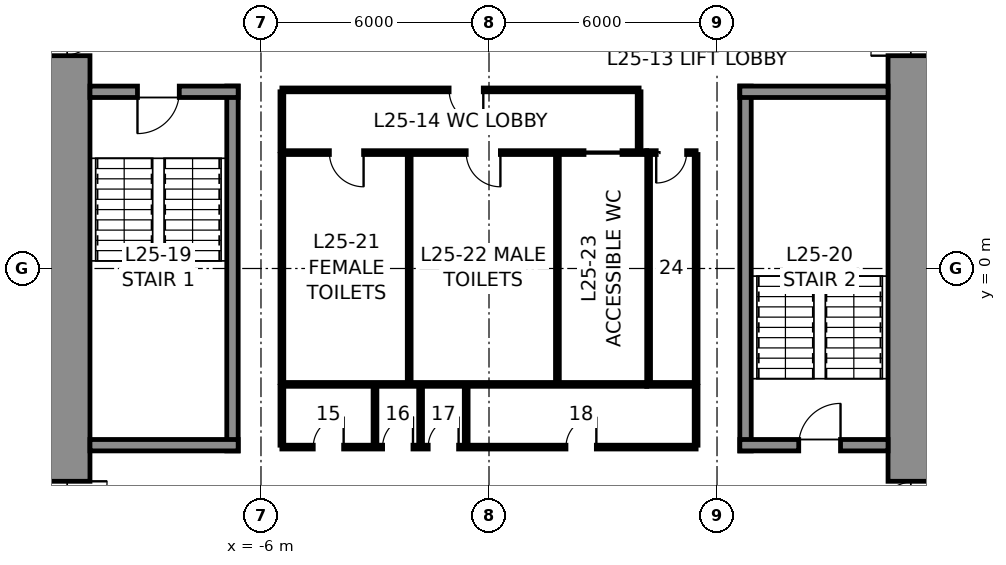
"""IFC4 building model, lengths in metres.
Left out: names, types, materials, properties, quantities, classifications, styles, units other than length and angle.
Written with IfcOpenShell. Run it as: python <this file> out.ifc"""

import sys

from ifc_helpers import new_model, si_unit, direction, frame, frame_2d, origin, place, context, subcontext, project, spatial, rectangle, extrude, element, fill, save


model = new_model("IFC4")
c1 = context("Model", 3, precision=1e-05, world=origin(), true_north=direction((0.0, 1.0)))
c2 = subcontext(c1, "Body", "Model", "MODEL_VIEW")
j1 = project(units=[si_unit("LENGTHUNIT", "METRE"), si_unit("PLANEANGLEUNIT", "RADIAN")], contexts=[c1])
p1 = place(None, origin())
s1 = spatial("IfcSite", under=j1, at=p1, CompositionType="ELEMENT")
p2 = place(p1, origin())
s2 = spatial("IfcBuilding", under=s1, at=p2, CompositionType="ELEMENT")
p3 = place(p2, frame((0.0, 0.0, 127.8)))
s3 = spatial("IfcBuildingStorey", under=s2, at=p3, CompositionType="ELEMENT", Elevation=127.8)
p4 = place(p3, frame((11.25, 10.5, 0.0), z_axis=(0.0, 0.0, 1.0), x_axis=(0.0, -1.0, 0.0)))
e1 = element("IfcWall", 1, at=p4, inside=s3, PredefinedType="SHEAR", context=c2, shape_type="SweptSolid", body=[
    extrude(rectangle(XDim=21.0, YDim=1.5, at=frame_2d((10.5, 0.0))), origin(), (0.0, 0.0, 1.0), 4.0),
])
p5 = place(p4, frame((3.7, 0.0, 0.0)))
e2 = element("IfcOpeningElement", 2, at=p5, cuts=e1, PredefinedType="OPENING", context=c2, shape_type="SweptSolid", body=[
    extrude(rectangle(XDim=1.2, YDim=2.3, at=frame_2d((0.6, 1.15))), frame((0.0, 0.76, 0.0), z_axis=(0.0, -1.0, 0.0), x_axis=(1.0, 0.0, 0.0)), (0.0, 0.0, 1.0), 1.52),
])
p6 = place(p4, frame((16.1, 0.0, 0.0)))
e3 = element("IfcOpeningElement", 3, at=p6, cuts=e1, PredefinedType="OPENING", context=c2, shape_type="SweptSolid", body=[
    extrude(rectangle(XDim=1.2, YDim=2.3, at=frame_2d((0.6, 1.15))), frame((0.0, 0.76, 0.0), z_axis=(0.0, -1.0, 0.0), x_axis=(1.0, 0.0, 0.0)), (0.0, 0.0, 1.0), 1.52),
])
p7 = place(p3, frame((-11.25, -10.5, 0.0), z_axis=(0.0, 0.0, 1.0), x_axis=(0.0, 1.0, 0.0)))
e4 = element("IfcWall", 4, at=p7, inside=s3, PredefinedType="SHEAR", context=c2, shape_type="SweptSolid", body=[
    extrude(rectangle(XDim=21.0, YDim=1.5, at=frame_2d((10.5, 0.0))), origin(), (0.0, 0.0, 1.0), 4.0),
])
p8 = place(p7, frame((16.1, 0.0, 0.0)))
e5 = element("IfcOpeningElement", 5, at=p8, cuts=e4, PredefinedType="OPENING", context=c2, shape_type="SweptSolid", body=[
    extrude(rectangle(XDim=1.2, YDim=2.3, at=frame_2d((0.6, 1.15))), frame((0.0, 0.76, 0.0), z_axis=(0.0, -1.0, 0.0), x_axis=(1.0, 0.0, 0.0)), (0.0, 0.0, 1.0), 1.52),
])
p9 = place(p7, frame((3.7, 0.0, 0.0)))
e6 = element("IfcOpeningElement", 6, at=p9, cuts=e4, PredefinedType="OPENING", context=c2, shape_type="SweptSolid", body=[
    extrude(rectangle(XDim=1.2, YDim=2.3, at=frame_2d((0.6, 1.15))), frame((0.0, 0.76, 0.0), z_axis=(0.0, -1.0, 0.0), x_axis=(1.0, 0.0, 0.0)), (0.0, 0.0, 1.0), 1.52),
])
p10 = place(p3, frame((-6.75, -4.8, 0.0), z_axis=(0.0, 0.0, 1.0), x_axis=(0.0, 1.0, 0.0)))
e7 = element("IfcWall", 7, at=p10, inside=s3, PredefinedType="SOLIDWALL", context=c2, shape_type="SweptSolid", body=[
    extrude(rectangle(XDim=9.6, YDim=0.3, at=frame_2d((4.8, 0.0))), origin(), (0.0, 0.0, 1.0), 3.75),
])
p11 = place(p3, frame((-10.5, 4.65, 0.0), z_axis=(0.0, 0.0, 1.0), x_axis=(1.0, 0.0, 0.0)))
e8 = element("IfcWall", 8, at=p11, inside=s3, PredefinedType="SOLIDWALL", context=c2, shape_type="SweptSolid", body=[
    extrude(rectangle(XDim=3.9, YDim=0.3, at=frame_2d((1.95, 0.0))), origin(), (0.0, 0.0, 1.0), 3.75),
])
p12 = place(p11, frame((1.25, 0.0, 0.0)))
e9 = element("IfcOpeningElement", 9, at=p12, cuts=e8, PredefinedType="OPENING", context=c2, shape_type="SweptSolid", body=[
    extrude(rectangle(XDim=1.1, YDim=2.3, at=frame_2d((0.55, 1.15))), frame((0.0, 0.16, 0.0), z_axis=(0.0, -1.0, 0.0), x_axis=(1.0, 0.0, 0.0)), (0.0, 0.0, 1.0), 0.32),
])
p13 = place(p3, frame((-6.6, -4.65, 0.0), z_axis=(0.0, 0.0, 1.0), x_axis=(-1.0, 0.0, 0.0)))
e10 = element("IfcWall", 10, at=p13, inside=s3, PredefinedType="SOLIDWALL", context=c2, shape_type="SweptSolid", body=[
    extrude(rectangle(XDim=3.9, YDim=0.3, at=frame_2d((1.95, 0.0))), origin(), (0.0, 0.0, 1.0), 3.75),
])
p14 = place(p3, frame((6.75, -4.8, 0.0), z_axis=(0.0, 0.0, 1.0), x_axis=(0.0, 1.0, 0.0)))
e11 = element("IfcWall", 11, at=p14, inside=s3, PredefinedType="SOLIDWALL", context=c2, shape_type="SweptSolid", body=[
    extrude(rectangle(XDim=9.6, YDim=0.3, at=frame_2d((4.8, 0.0))), origin(), (0.0, 0.0, 1.0), 3.75),
])
p15 = place(p3, frame((6.6, 4.65, 0.0), z_axis=(0.0, 0.0, 1.0), x_axis=(1.0, 0.0, 0.0)))
e12 = element("IfcWall", 12, at=p15, inside=s3, PredefinedType="SOLIDWALL", context=c2, shape_type="SweptSolid", body=[
    extrude(rectangle(XDim=3.9, YDim=0.3, at=frame_2d((1.95, 0.0))), origin(), (0.0, 0.0, 1.0), 3.75),
])
p16 = place(p3, frame((10.5, -4.65, 0.0), z_axis=(0.0, 0.0, 1.0), x_axis=(-1.0, 0.0, 0.0)))
e13 = element("IfcWall", 13, at=p16, inside=s3, PredefinedType="SOLIDWALL", context=c2, shape_type="SweptSolid", body=[
    extrude(rectangle(XDim=3.9, YDim=0.3, at=frame_2d((1.95, 0.0))), origin(), (0.0, 0.0, 1.0), 3.75),
])
p17 = place(p16, frame((1.25, 0.0, 0.0)))
e14 = element("IfcOpeningElement", 14, at=p17, cuts=e13, PredefinedType="OPENING", context=c2, shape_type="SweptSolid", body=[
    extrude(rectangle(XDim=1.1, YDim=2.3, at=frame_2d((0.55, 1.15))), frame((0.0, 0.16, 0.0), z_axis=(0.0, -1.0, 0.0), x_axis=(1.0, 0.0, 0.0)), (0.0, 0.0, 1.0), 0.32),
])
p18 = place(p3, frame((-5.45, 3.05, 0.0), z_axis=(0.0, 0.0, 1.0), x_axis=(1.0, 0.0, 0.0)))
e15 = element("IfcWall", 15, at=p18, inside=s3, PredefinedType="PARTITIONING", context=c2, shape_type="SweptSolid", body=[
    extrude(rectangle(XDim=9.6, YDim=0.1, at=frame_2d((4.8, 0.0))), origin(), (0.0, 0.0, 1.0), 3.75),
])
p19 = place(p18, frame((1.25, 0.0, 0.0)))
e16 = element("IfcOpeningElement", 16, at=p19, cuts=e15, PredefinedType="OPENING", context=c2, shape_type="SweptSolid", body=[
    extrude(rectangle(XDim=0.9, YDim=2.3, at=frame_2d((0.45, 1.15))), frame((0.0, 0.06, 0.0), z_axis=(0.0, -1.0, 0.0), x_axis=(1.0, 0.0, 0.0)), (0.0, 0.0, 1.0), 0.12),
])
p20 = place(p18, frame((4.85, 0.0, 0.0)))
e17 = element("IfcOpeningElement", 17, at=p20, cuts=e15, PredefinedType="OPENING", context=c2, shape_type="SweptSolid", body=[
    extrude(rectangle(XDim=0.9, YDim=2.3, at=frame_2d((0.45, 1.15))), frame((0.0, 0.06, 0.0), z_axis=(0.0, -1.0, 0.0), x_axis=(1.0, 0.0, 0.0)), (0.0, 0.0, 1.0), 0.12),
])
p21 = place(p18, frame((7.95, 0.0, 0.0)))
e18 = element("IfcOpeningElement", 18, at=p21, cuts=e15, PredefinedType="OPENING", context=c2, shape_type="SweptSolid", body=[
    extrude(rectangle(XDim=1.0, YDim=2.3, at=frame_2d((0.5, 1.15))), frame((0.0, 0.06, 0.0), z_axis=(0.0, -1.0, 0.0), x_axis=(1.0, 0.0, 0.0)), (0.0, 0.0, 1.0), 0.12),
])
p22 = place(p3, frame((4.15, 3.05, 0.0), z_axis=(0.0, 0.0, 1.0), x_axis=(1.0, 0.0, 0.0)))
e19 = element("IfcWall", 19, at=p22, inside=s3, PredefinedType="PARTITIONING", context=c2, shape_type="SweptSolid", body=[
    extrude(rectangle(XDim=1.3, YDim=0.1, at=frame_2d((0.65, 0.0))), origin(), (0.0, 0.0, 1.0), 3.75),
])
p23 = place(p22, frame((0.25, 0.0, 0.0)))
e20 = element("IfcOpeningElement", 20, at=p23, cuts=e19, PredefinedType="OPENING", context=c2, shape_type="SweptSolid", body=[
    extrude(rectangle(XDim=0.8, YDim=2.3, at=frame_2d((0.4, 1.15))), frame((0.0, 0.06, 0.0), z_axis=(0.0, -1.0, 0.0), x_axis=(1.0, 0.0, 0.0)), (0.0, 0.0, 1.0), 0.12),
])
p24 = place(p3, frame((4.15, -3.05, 0.0), z_axis=(0.0, 0.0, 1.0), x_axis=(-1.0, 0.0, 0.0)))
e21 = element("IfcWall", 21, at=p24, inside=s3, PredefinedType="PARTITIONING", context=c2, shape_type="SweptSolid", body=[
    extrude(rectangle(XDim=9.6, YDim=0.1, at=frame_2d((4.8, 0.0))), origin(), (0.0, 0.0, 1.0), 3.75),
])
p25 = place(p3, frame((5.45, -3.05, 0.0), z_axis=(0.0, 0.0, 1.0), x_axis=(-1.0, 0.0, 0.0)))
e22 = element("IfcWall", 22, at=p25, inside=s3, PredefinedType="PARTITIONING", context=c2, shape_type="SweptSolid", body=[
    extrude(rectangle(XDim=1.3, YDim=0.1, at=frame_2d((0.65, 0.0))), origin(), (0.0, 0.0, 1.0), 3.75),
])
for number, where, z_axis, x_axis in (
    (23, (5.45, 3.0, 0.0), (0.0, 0.0, 1.0), (0.0, -1.0, 0.0)),
    (24, (-5.45, -3.0, 0.0), (0.0, 0.0, 1.0), (0.0, 1.0, 0.0)),
    (25, (-2.1, -3.0, 0.0), (0.0, 0.0, 1.0), (0.0, 1.0, 0.0)),
    (26, (1.8, -3.0, 0.0), (0.0, 0.0, 1.0), (0.0, 1.0, 0.0)),
    (27, (4.2, -3.0, 0.0), (0.0, 0.0, 1.0), (0.0, 1.0, 0.0)),
):
    element("IfcWall", number, at=place(p3, frame(where, z_axis=z_axis, x_axis=x_axis)), inside=s3, PredefinedType="PARTITIONING", context=c2, shape_type="SweptSolid", body=[
        extrude(rectangle(XDim=6.0, YDim=0.1, at=frame_2d((3.0, 0.0))), origin(), (0.0, 0.0, 1.0), 3.75),
    ])
p26 = place(p3, frame((-5.45, 4.7, 0.0), z_axis=(0.0, 0.0, 1.0), x_axis=(1.0, 0.0, 0.0)))
e28 = element("IfcWall", 28, at=p26, inside=s3, PredefinedType="PARTITIONING", context=c2, shape_type="SweptSolid", body=[
    extrude(rectangle(XDim=9.4, YDim=0.1, at=frame_2d((4.7, 0.0))), origin(), (0.0, 0.0, 1.0), 3.75),
])
p27 = place(p26, frame((4.4, 0.0, 0.0)))
e29 = element("IfcOpeningElement", 29, at=p27, cuts=e28, PredefinedType="OPENING", context=c2, shape_type="SweptSolid", body=[
    extrude(rectangle(XDim=0.9, YDim=2.3, at=frame_2d((0.45, 1.15))), frame((0.0, 0.06, 0.0), z_axis=(0.0, -1.0, 0.0), x_axis=(1.0, 0.0, 0.0)), (0.0, 0.0, 1.0), 0.12),
])
for number, where, z_axis, x_axis in (
    (30, (-5.45, 3.1, 0.0), (0.0, 0.0, 1.0), (0.0, 1.0, 0.0)),
    (31, (3.95, 3.1, 0.0), (0.0, 0.0, 1.0), (0.0, 1.0, 0.0)),
):
    element("IfcWall", number, at=place(p3, frame(where, z_axis=z_axis, x_axis=x_axis)), inside=s3, PredefinedType="PARTITIONING", context=c2, shape_type="SweptSolid", body=[
        extrude(rectangle(XDim=1.55, YDim=0.1, at=frame_2d((0.775, 0.0))), origin(), (0.0, 0.0, 1.0), 3.75),
    ])
p28 = place(p3, frame((5.45, -4.7, 0.0), z_axis=(0.0, 0.0, 1.0), x_axis=(-1.0, 0.0, 0.0)))
e32 = element("IfcWall", 32, at=p28, inside=s3, PredefinedType="PARTITIONING", context=c2, shape_type="SweptSolid", body=[
    extrude(rectangle(XDim=10.9, YDim=0.1, at=frame_2d((5.45, 0.0))), origin(), (0.0, 0.0, 1.0), 3.75),
])
p29 = place(p28, frame((9.275, 0.0, 0.0)))
e33 = element("IfcOpeningElement", 33, at=p29, cuts=e32, PredefinedType="OPENING", context=c2, shape_type="SweptSolid", body=[
    extrude(rectangle(XDim=0.8, YDim=2.3, at=frame_2d((0.4, 1.15))), frame((0.0, 0.06, 0.0), z_axis=(0.0, -1.0, 0.0), x_axis=(1.0, 0.0, 0.0)), (0.0, 0.0, 1.0), 0.12),
])
p30 = place(p28, frame((7.45, 0.0, 0.0)))
e34 = element("IfcOpeningElement", 34, at=p30, cuts=e32, PredefinedType="OPENING", context=c2, shape_type="SweptSolid", body=[
    extrude(rectangle(XDim=0.8, YDim=2.3, at=frame_2d((0.4, 1.15))), frame((0.0, 0.06, 0.0), z_axis=(0.0, -1.0, 0.0), x_axis=(1.0, 0.0, 0.0)), (0.0, 0.0, 1.0), 0.12),
])
p31 = place(p28, frame((6.25, 0.0, 0.0)))
e35 = element("IfcOpeningElement", 35, at=p31, cuts=e32, PredefinedType="OPENING", context=c2, shape_type="SweptSolid", body=[
    extrude(rectangle(XDim=0.8, YDim=2.3, at=frame_2d((0.4, 1.15))), frame((0.0, 0.06, 0.0), z_axis=(0.0, -1.0, 0.0), x_axis=(1.0, 0.0, 0.0)), (0.0, 0.0, 1.0), 0.12),
])
p32 = place(p28, frame((2.625, 0.0, 0.0)))
e36 = element("IfcOpeningElement", 36, at=p32, cuts=e32, PredefinedType="OPENING", context=c2, shape_type="SweptSolid", body=[
    extrude(rectangle(XDim=0.8, YDim=2.3, at=frame_2d((0.4, 1.15))), frame((0.0, 0.06, 0.0), z_axis=(0.0, -1.0, 0.0), x_axis=(1.0, 0.0, 0.0)), (0.0, 0.0, 1.0), 0.12),
])
for number, where, z_axis, x_axis in (
    (37, (-5.45, -3.1, 0.0), (0.0, 0.0, 1.0), (0.0, -1.0, 0.0)),
    (38, (5.45, -3.1, 0.0), (0.0, 0.0, 1.0), (0.0, -1.0, 0.0)),
    (39, (-3.0, -3.1, 0.0), (0.0, 0.0, 1.0), (0.0, -1.0, 0.0)),
    (40, (-1.8, -3.1, 0.0), (0.0, 0.0, 1.0), (0.0, -1.0, 0.0)),
    (41, (-0.6, -3.1, 0.0), (0.0, 0.0, 1.0), (0.0, -1.0, 0.0)),
):
    element("IfcWall", number, at=place(p3, frame(where, z_axis=z_axis, x_axis=x_axis)), inside=s3, PredefinedType="PARTITIONING", context=c2, shape_type="SweptSolid", body=[
        extrude(rectangle(XDim=1.55, YDim=0.1, at=frame_2d((0.775, 0.0))), origin(), (0.0, 0.0, 1.0), 3.75),
    ])
p33 = place(p12, frame((1.1, 0.0, 0.0), z_axis=(0.0, 0.0, 1.0), x_axis=(-1.0, 0.0, 0.0)))
e42 = element("IfcDoor", 42, at=p33, inside=s3, OperationType="SINGLE_SWING_RIGHT", PredefinedType="DOOR", context=c2, shape_type="SweptSolid", body=[
    extrude(rectangle(XDim=1.1, YDim=2.3, at=frame_2d((0.55, 1.15))), frame((0.0, 0.025, 0.0), z_axis=(0.0, -1.0, 0.0), x_axis=(1.0, 0.0, 0.0)), (0.0, 0.0, 1.0), 0.05),
])
fill(e9, e42)
p34 = place(p17, frame((1.1, 0.0, 0.0), z_axis=(0.0, 0.0, 1.0), x_axis=(-1.0, 0.0, 0.0)))
e43 = element("IfcDoor", 43, at=p34, inside=s3, OperationType="SINGLE_SWING_RIGHT", PredefinedType="DOOR", context=c2, shape_type="SweptSolid", body=[
    extrude(rectangle(XDim=1.1, YDim=2.3, at=frame_2d((0.55, 1.15))), frame((0.0, 0.025, 0.0), z_axis=(0.0, -1.0, 0.0), x_axis=(1.0, 0.0, 0.0)), (0.0, 0.0, 1.0), 0.05),
])
fill(e14, e43)
p35 = place(p19, frame((0.9, 0.0, 0.0), z_axis=(0.0, 0.0, 1.0), x_axis=(-1.0, 0.0, 0.0)))
e44 = element("IfcDoor", 44, at=p35, inside=s3, OperationType="SINGLE_SWING_LEFT", PredefinedType="DOOR", context=c2, shape_type="SweptSolid", body=[
    extrude(rectangle(XDim=0.9, YDim=2.3, at=frame_2d((0.45, 1.15))), frame((0.0, 0.025, 0.0), z_axis=(0.0, -1.0, 0.0), x_axis=(1.0, 0.0, 0.0)), (0.0, 0.0, 1.0), 0.05),
])
fill(e16, e44)
p36 = place(p20, frame((0.9, 0.0, 0.0), z_axis=(0.0, 0.0, 1.0), x_axis=(-1.0, 0.0, 0.0)))
e45 = element("IfcDoor", 45, at=p36, inside=s3, OperationType="SINGLE_SWING_LEFT", PredefinedType="DOOR", context=c2, shape_type="SweptSolid", body=[
    extrude(rectangle(XDim=0.9, YDim=2.3, at=frame_2d((0.45, 1.15))), frame((0.0, 0.025, 0.0), z_axis=(0.0, -1.0, 0.0), x_axis=(1.0, 0.0, 0.0)), (0.0, 0.0, 1.0), 0.05),
])
fill(e17, e45)
p37 = place(p21, frame((1.0, 0.0, 0.0), z_axis=(0.0, 0.0, 1.0), x_axis=(-1.0, 0.0, 0.0)))
e46 = element("IfcDoor", 46, at=p37, inside=s3, OperationType="SLIDING_TO_LEFT", PredefinedType="DOOR", context=c2, shape_type="SweptSolid", body=[
    extrude(rectangle(XDim=1.0, YDim=2.3, at=frame_2d((0.5, 1.15))), frame((0.0, 0.025, 0.0), z_axis=(0.0, -1.0, 0.0), x_axis=(1.0, 0.0, 0.0)), (0.0, 0.0, 1.0), 0.05),
])
fill(e18, e46)
p38 = place(p23, frame((0.8, 0.0, 0.0), z_axis=(0.0, 0.0, 1.0), x_axis=(-1.0, 0.0, 0.0)))
e47 = element("IfcDoor", 47, at=p38, inside=s3, OperationType="SINGLE_SWING_RIGHT", PredefinedType="DOOR", context=c2, shape_type="SweptSolid", body=[
    extrude(rectangle(XDim=0.8, YDim=2.3, at=frame_2d((0.4, 1.15))), frame((0.0, 0.025, 0.0), z_axis=(0.0, -1.0, 0.0), x_axis=(1.0, 0.0, 0.0)), (0.0, 0.0, 1.0), 0.05),
])
fill(e20, e47)
p39 = place(p27, frame((0.9, 0.0, 0.0), z_axis=(0.0, 0.0, 1.0), x_axis=(-1.0, 0.0, 0.0)))
e48 = element("IfcDoor", 48, at=p39, inside=s3, OperationType="SINGLE_SWING_LEFT", PredefinedType="DOOR", context=c2, shape_type="SweptSolid", body=[
    extrude(rectangle(XDim=0.9, YDim=2.3, at=frame_2d((0.45, 1.15))), frame((0.0, 0.025, 0.0), z_axis=(0.0, -1.0, 0.0), x_axis=(1.0, 0.0, 0.0)), (0.0, 0.0, 1.0), 0.05),
])
fill(e29, e48)
p40 = place(p29, frame((0.8, 0.0, 0.0), z_axis=(0.0, 0.0, 1.0), x_axis=(-1.0, 0.0, 0.0)))
e49 = element("IfcDoor", 49, at=p40, inside=s3, OperationType="SINGLE_SWING_RIGHT", PredefinedType="DOOR", context=c2, shape_type="SweptSolid", body=[
    extrude(rectangle(XDim=0.8, YDim=2.3, at=frame_2d((0.4, 1.15))), frame((0.0, 0.025, 0.0), z_axis=(0.0, -1.0, 0.0), x_axis=(1.0, 0.0, 0.0)), (0.0, 0.0, 1.0), 0.05),
])
fill(e33, e49)
p41 = place(p30, frame((0.8, 0.0, 0.0), z_axis=(0.0, 0.0, 1.0), x_axis=(-1.0, 0.0, 0.0)))
e50 = element("IfcDoor", 50, at=p41, inside=s3, OperationType="SINGLE_SWING_RIGHT", PredefinedType="DOOR", context=c2, shape_type="SweptSolid", body=[
    extrude(rectangle(XDim=0.8, YDim=2.3, at=frame_2d((0.4, 1.15))), frame((0.0, 0.025, 0.0), z_axis=(0.0, -1.0, 0.0), x_axis=(1.0, 0.0, 0.0)), (0.0, 0.0, 1.0), 0.05),
])
fill(e34, e50)
p42 = place(p31, frame((0.8, 0.0, 0.0), z_axis=(0.0, 0.0, 1.0), x_axis=(-1.0, 0.0, 0.0)))
e51 = element("IfcDoor", 51, at=p42, inside=s3, OperationType="SINGLE_SWING_RIGHT", PredefinedType="DOOR", context=c2, shape_type="SweptSolid", body=[
    extrude(rectangle(XDim=0.8, YDim=2.3, at=frame_2d((0.4, 1.15))), frame((0.0, 0.025, 0.0), z_axis=(0.0, -1.0, 0.0), x_axis=(1.0, 0.0, 0.0)), (0.0, 0.0, 1.0), 0.05),
])
fill(e35, e51)
p43 = place(p32, frame((0.8, 0.0, 0.0), z_axis=(0.0, 0.0, 1.0), x_axis=(-1.0, 0.0, 0.0)))
e52 = element("IfcDoor", 52, at=p43, inside=s3, OperationType="SINGLE_SWING_RIGHT", PredefinedType="DOOR", context=c2, shape_type="SweptSolid", body=[
    extrude(rectangle(XDim=0.8, YDim=2.3, at=frame_2d((0.4, 1.15))), frame((0.0, 0.025, 0.0), z_axis=(0.0, -1.0, 0.0), x_axis=(1.0, 0.0, 0.0)), (0.0, 0.0, 1.0), 0.05),
])
fill(e36, e52)
p44 = place(p8, frame((1.2, 0.0, 0.0), z_axis=(0.0, 0.0, 1.0), x_axis=(-1.0, 0.0, 0.0)))
e53 = element("IfcDoor", 53, at=p44, inside=s3, OperationType="SINGLE_SWING_LEFT", PredefinedType="DOOR", context=c2, shape_type="SweptSolid", body=[
    extrude(rectangle(XDim=1.2, YDim=2.3, at=frame_2d((0.6, 1.15))), frame((0.0, 0.025, 0.0), z_axis=(0.0, -1.0, 0.0), x_axis=(1.0, 0.0, 0.0)), (0.0, 0.0, 1.0), 0.05),
])
fill(e5, e53)
p45 = place(p9, frame((1.2, 0.0, 0.0), z_axis=(0.0, 0.0, 1.0), x_axis=(-1.0, 0.0, 0.0)))
e54 = element("IfcDoor", 54, at=p45, inside=s3, OperationType="SINGLE_SWING_LEFT", PredefinedType="DOOR", context=c2, shape_type="SweptSolid", body=[
    extrude(rectangle(XDim=1.2, YDim=2.3, at=frame_2d((0.6, 1.15))), frame((0.0, 0.025, 0.0), z_axis=(0.0, -1.0, 0.0), x_axis=(1.0, 0.0, 0.0)), (0.0, 0.0, 1.0), 0.05),
])
fill(e6, e54)
p46 = place(p5, frame((1.2, 0.0, 0.0), z_axis=(0.0, 0.0, 1.0), x_axis=(-1.0, 0.0, 0.0)))
e55 = element("IfcDoor", 55, at=p46, inside=s3, OperationType="SINGLE_SWING_LEFT", PredefinedType="DOOR", context=c2, shape_type="SweptSolid", body=[
    extrude(rectangle(XDim=1.2, YDim=2.3, at=frame_2d((0.6, 1.15))), frame((0.0, 0.025, 0.0), z_axis=(0.0, -1.0, 0.0), x_axis=(1.0, 0.0, 0.0)), (0.0, 0.0, 1.0), 0.05),
])
fill(e2, e55)
p47 = place(p6, frame((1.2, 0.0, 0.0), z_axis=(0.0, 0.0, 1.0), x_axis=(-1.0, 0.0, 0.0)))
e56 = element("IfcDoor", 56, at=p47, inside=s3, OperationType="SINGLE_SWING_LEFT", PredefinedType="DOOR", context=c2, shape_type="SweptSolid", body=[
    extrude(rectangle(XDim=1.2, YDim=2.3, at=frame_2d((0.6, 1.15))), frame((0.0, 0.025, 0.0), z_axis=(0.0, -1.0, 0.0), x_axis=(1.0, 0.0, 0.0)), (0.0, 0.0, 1.0), 0.05),
])
fill(e3, e56)
save(model, sys.argv[1])
